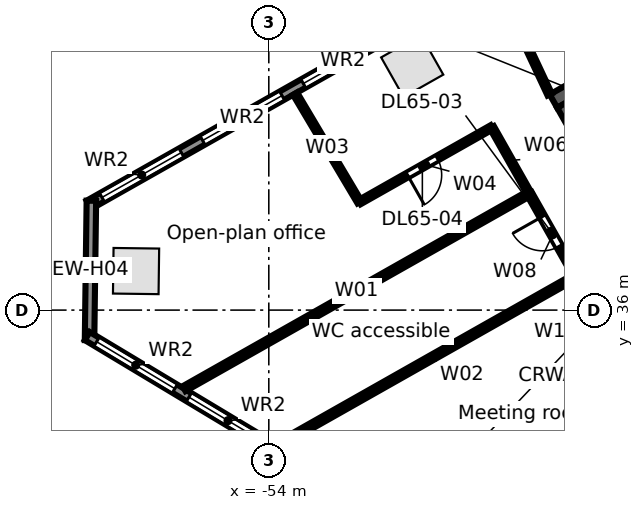
"""IFC4 building model, lengths in metres.
Left out: names, types, materials, properties, quantities, classifications, styles, units other than length and angle.
Written with IfcOpenShell. Run it as: python <this file> out.ifc"""

import sys

from ifc_helpers import new_model, si_unit, direction, frame, frame_2d, origin, origin_2d, place, context, subcontext, project, spatial, rectangle, extrude, element, fill, save


model = new_model("IFC4")
c1 = context("Model", 3, precision=1e-05, world=origin(), true_north=direction((0.0, 1.0)))
c2 = subcontext(c1, "Body", "Model", "MODEL_VIEW")
j1 = project(units=[si_unit("LENGTHUNIT", "METRE"), si_unit("PLANEANGLEUNIT", "RADIAN")], contexts=[c1])
p1 = place(None, origin())
s1 = spatial("IfcSite", under=j1, at=p1, CompositionType="ELEMENT")
p2 = place(p1, origin())
s2 = spatial("IfcBuilding", under=s1, at=p2, CompositionType="ELEMENT")
p3 = place(p2, frame((0.0, 0.0, 293.1)))
s3 = spatial("IfcBuildingStorey", under=s2, at=p3, CompositionType="ELEMENT", Elevation=293.1)
for number, where, z_axis, x_axis in (
    (1, (-50.226, 42.423, 0.0), (0.0, 0.0, 1.0), (-0.87, -0.492, 0.0)),
    (2, (-57.493, 37.027, 0.0), (0.0, 0.0, 1.0), (-0.013, -1.0, 0.0)),
):
    element("IfcColumn", number, at=place(p3, frame(where, z_axis=z_axis, x_axis=x_axis)), inside=s3, PredefinedType="COLUMN", context=c2, shape_type="SweptSolid", body=[
        extrude(rectangle(XDim=1.2, YDim=1.2, at=origin_2d()), origin(), (0.0, 0.0, 1.0), 3.8),
    ])
p4 = place(p3, frame((-58.732, 38.771, 0.0), z_axis=(0.0, 0.0, 1.0), x_axis=(0.870355615581, 0.492423702137, 0.0)))
e3 = element("IfcWall", 3, at=p4, inside=s3, PredefinedType="STANDARD", context=c2, shape_type="SweptSolid", body=[
    extrude(rectangle(XDim=64.052, YDim=0.25, at=frame_2d((32.026, 0.0))), origin(), (0.0, 0.0, 1.0), 3.52),
])
p5 = place(p4, frame((61.259, 0.0, 0.8)))
e4 = element("IfcOpeningElement", 4, at=p5, cuts=e3, PredefinedType="OPENING", context=c2, shape_type="SweptSolid", body=[
    extrude(rectangle(XDim=2.4, YDim=2.2, at=frame_2d((1.2, 1.1))), frame((0.0, 0.135, 0.0), z_axis=(0.0, -1.0, 0.0), x_axis=(1.0, 0.0, 0.0)), (0.0, 0.0, 1.0), 0.27),
])
p6 = place(p4, frame((58.216, 0.0, 0.8)))
e5 = element("IfcOpeningElement", 5, at=p6, cuts=e3, PredefinedType="OPENING", context=c2, shape_type="SweptSolid", body=[
    extrude(rectangle(XDim=2.4, YDim=2.2, at=frame_2d((1.2, 1.1))), frame((0.0, 0.135, 0.0), z_axis=(0.0, -1.0, 0.0), x_axis=(1.0, 0.0, 0.0)), (0.0, 0.0, 1.0), 0.27),
])
p7 = place(p4, frame((55.173, 0.0, 0.8)))
e6 = element("IfcOpeningElement", 6, at=p7, cuts=e3, PredefinedType="OPENING", context=c2, shape_type="SweptSolid", body=[
    extrude(rectangle(XDim=2.4, YDim=2.2, at=frame_2d((1.2, 1.1))), frame((0.0, 0.135, 0.0), z_axis=(0.0, -1.0, 0.0), x_axis=(1.0, 0.0, 0.0)), (0.0, 0.0, 1.0), 0.27),
])
p8 = place(p4, frame((52.129, 0.0, 0.8)))
e7 = element("IfcOpeningElement", 7, at=p8, cuts=e3, PredefinedType="OPENING", context=c2, shape_type="SweptSolid", body=[
    extrude(rectangle(XDim=2.4, YDim=2.2, at=frame_2d((1.2, 1.1))), frame((0.0, 0.135, 0.0), z_axis=(0.0, -1.0, 0.0), x_axis=(1.0, 0.0, 0.0)), (0.0, 0.0, 1.0), 0.27),
])
p9 = place(p4, frame((49.086, 0.0, 0.8)))
e8 = element("IfcOpeningElement", 8, at=p9, cuts=e3, PredefinedType="OPENING", context=c2, shape_type="SweptSolid", body=[
    extrude(rectangle(XDim=2.4, YDim=2.2, at=frame_2d((1.2, 1.1))), frame((0.0, 0.135, 0.0), z_axis=(0.0, -1.0, 0.0), x_axis=(1.0, 0.0, 0.0)), (0.0, 0.0, 1.0), 0.27),
])
p10 = place(p4, frame((46.043, 0.0, 0.8)))
e9 = element("IfcOpeningElement", 9, at=p10, cuts=e3, PredefinedType="OPENING", context=c2, shape_type="SweptSolid", body=[
    extrude(rectangle(XDim=2.4, YDim=2.2, at=frame_2d((1.2, 1.1))), frame((0.0, 0.135, 0.0), z_axis=(0.0, -1.0, 0.0), x_axis=(1.0, 0.0, 0.0)), (0.0, 0.0, 1.0), 0.27),
])
p11 = place(p4, frame((43.0, 0.0, 0.8)))
e10 = element("IfcOpeningElement", 10, at=p11, cuts=e3, PredefinedType="OPENING", context=c2, shape_type="SweptSolid", body=[
    extrude(rectangle(XDim=2.4, YDim=2.2, at=frame_2d((1.2, 1.1))), frame((0.0, 0.135, 0.0), z_axis=(0.0, -1.0, 0.0), x_axis=(1.0, 0.0, 0.0)), (0.0, 0.0, 1.0), 0.27),
])
p12 = place(p4, frame((39.956, 0.0, 0.8)))
e11 = element("IfcOpeningElement", 11, at=p12, cuts=e3, PredefinedType="OPENING", context=c2, shape_type="SweptSolid", body=[
    extrude(rectangle(XDim=2.4, YDim=2.2, at=frame_2d((1.2, 1.1))), frame((0.0, 0.135, 0.0), z_axis=(0.0, -1.0, 0.0), x_axis=(1.0, 0.0, 0.0)), (0.0, 0.0, 1.0), 0.27),
])
p13 = place(p4, frame((36.913, 0.0, 0.8)))
e12 = element("IfcOpeningElement", 12, at=p13, cuts=e3, PredefinedType="OPENING", context=c2, shape_type="SweptSolid", body=[
    extrude(rectangle(XDim=2.4, YDim=2.2, at=frame_2d((1.2, 1.1))), frame((0.0, 0.135, 0.0), z_axis=(0.0, -1.0, 0.0), x_axis=(1.0, 0.0, 0.0)), (0.0, 0.0, 1.0), 0.27),
])
p14 = place(p4, frame((33.87, 0.0, 0.8)))
e13 = element("IfcOpeningElement", 13, at=p14, cuts=e3, PredefinedType="OPENING", context=c2, shape_type="SweptSolid", body=[
    extrude(rectangle(XDim=2.4, YDim=2.2, at=frame_2d((1.2, 1.1))), frame((0.0, 0.135, 0.0), z_axis=(0.0, -1.0, 0.0), x_axis=(1.0, 0.0, 0.0)), (0.0, 0.0, 1.0), 0.27),
])
p15 = place(p4, frame((30.826, 0.0, 0.8)))
e14 = element("IfcOpeningElement", 14, at=p15, cuts=e3, PredefinedType="OPENING", context=c2, shape_type="SweptSolid", body=[
    extrude(rectangle(XDim=2.4, YDim=2.2, at=frame_2d((1.2, 1.1))), frame((0.0, 0.135, 0.0), z_axis=(0.0, -1.0, 0.0), x_axis=(1.0, 0.0, 0.0)), (0.0, 0.0, 1.0), 0.27),
])
p16 = place(p4, frame((27.783, 0.0, 0.8)))
e15 = element("IfcOpeningElement", 15, at=p16, cuts=e3, PredefinedType="OPENING", context=c2, shape_type="SweptSolid", body=[
    extrude(rectangle(XDim=2.4, YDim=2.2, at=frame_2d((1.2, 1.1))), frame((0.0, 0.135, 0.0), z_axis=(0.0, -1.0, 0.0), x_axis=(1.0, 0.0, 0.0)), (0.0, 0.0, 1.0), 0.27),
])
p17 = place(p4, frame((24.74, 0.0, 0.8)))
e16 = element("IfcOpeningElement", 16, at=p17, cuts=e3, PredefinedType="OPENING", context=c2, shape_type="SweptSolid", body=[
    extrude(rectangle(XDim=2.4, YDim=2.2, at=frame_2d((1.2, 1.1))), frame((0.0, 0.135, 0.0), z_axis=(0.0, -1.0, 0.0), x_axis=(1.0, 0.0, 0.0)), (0.0, 0.0, 1.0), 0.27),
])
p18 = place(p4, frame((21.696, 0.0, 0.8)))
e17 = element("IfcOpeningElement", 17, at=p18, cuts=e3, PredefinedType="OPENING", context=c2, shape_type="SweptSolid", body=[
    extrude(rectangle(XDim=2.4, YDim=2.2, at=frame_2d((1.2, 1.1))), frame((0.0, 0.135, 0.0), z_axis=(0.0, -1.0, 0.0), x_axis=(1.0, 0.0, 0.0)), (0.0, 0.0, 1.0), 0.27),
])
p19 = place(p4, frame((18.653, 0.0, 0.8)))
e18 = element("IfcOpeningElement", 18, at=p19, cuts=e3, PredefinedType="OPENING", context=c2, shape_type="SweptSolid", body=[
    extrude(rectangle(XDim=2.4, YDim=2.2, at=frame_2d((1.2, 1.1))), frame((0.0, 0.135, 0.0), z_axis=(0.0, -1.0, 0.0), x_axis=(1.0, 0.0, 0.0)), (0.0, 0.0, 1.0), 0.27),
])
p20 = place(p4, frame((15.61, 0.0, 0.8)))
e19 = element("IfcOpeningElement", 19, at=p20, cuts=e3, PredefinedType="OPENING", context=c2, shape_type="SweptSolid", body=[
    extrude(rectangle(XDim=2.4, YDim=2.2, at=frame_2d((1.2, 1.1))), frame((0.0, 0.135, 0.0), z_axis=(0.0, -1.0, 0.0), x_axis=(1.0, 0.0, 0.0)), (0.0, 0.0, 1.0), 0.27),
])
p21 = place(p4, frame((12.567, 0.0, 0.8)))
e20 = element("IfcOpeningElement", 20, at=p21, cuts=e3, PredefinedType="OPENING", context=c2, shape_type="SweptSolid", body=[
    extrude(rectangle(XDim=2.4, YDim=2.2, at=frame_2d((1.2, 1.1))), frame((0.0, 0.135, 0.0), z_axis=(0.0, -1.0, 0.0), x_axis=(1.0, 0.0, 0.0)), (0.0, 0.0, 1.0), 0.27),
])
p22 = place(p4, frame((9.523, 0.0, 0.8)))
e21 = element("IfcOpeningElement", 21, at=p22, cuts=e3, PredefinedType="OPENING", context=c2, shape_type="SweptSolid", body=[
    extrude(rectangle(XDim=2.4, YDim=2.2, at=frame_2d((1.2, 1.1))), frame((0.0, 0.135, 0.0), z_axis=(0.0, -1.0, 0.0), x_axis=(1.0, 0.0, 0.0)), (0.0, 0.0, 1.0), 0.27),
])
p23 = place(p4, frame((6.48, 0.0, 0.8)))
e22 = element("IfcOpeningElement", 22, at=p23, cuts=e3, PredefinedType="OPENING", context=c2, shape_type="SweptSolid", body=[
    extrude(rectangle(XDim=2.4, YDim=2.2, at=frame_2d((1.2, 1.1))), frame((0.0, 0.135, 0.0), z_axis=(0.0, -1.0, 0.0), x_axis=(1.0, 0.0, 0.0)), (0.0, 0.0, 1.0), 0.27),
])
p24 = place(p4, frame((3.437, 0.0, 0.8)))
e23 = element("IfcOpeningElement", 23, at=p24, cuts=e3, PredefinedType="OPENING", context=c2, shape_type="SweptSolid", body=[
    extrude(rectangle(XDim=2.4, YDim=2.2, at=frame_2d((1.2, 1.1))), frame((0.0, 0.135, 0.0), z_axis=(0.0, -1.0, 0.0), x_axis=(1.0, 0.0, 0.0)), (0.0, 0.0, 1.0), 0.27),
])
p25 = place(p4, frame((0.393, 0.0, 0.8)))
e24 = element("IfcOpeningElement", 24, at=p25, cuts=e3, PredefinedType="OPENING", context=c2, shape_type="SweptSolid", body=[
    extrude(rectangle(XDim=2.4, YDim=2.2, at=frame_2d((1.2, 1.1))), frame((0.0, 0.135, 0.0), z_axis=(0.0, -1.0, 0.0), x_axis=(1.0, 0.0, 0.0)), (0.0, 0.0, 1.0), 0.27),
])
p26 = place(p3, frame((-58.717, 35.208, 0.0), z_axis=(0.0, 0.0, 1.0), x_axis=(0.01310512158, 0.999914124207, 0.0)))
e25 = element("IfcWall", 25, at=p26, inside=s3, PredefinedType="STANDARD", context=c2, shape_type="SweptSolid", body=[
    extrude(rectangle(XDim=3.67, YDim=0.25, at=frame_2d((1.835, 0.0))), origin(), (0.0, 0.0, 1.0), 3.52),
])
p27 = place(p3, frame((-44.115, 26.507, 0.0), z_axis=(0.0, 0.0, 1.0), x_axis=(-0.857166583633, 0.515039268311, 0.0)))
e26 = element("IfcWall", 26, at=p27, inside=s3, PredefinedType="STANDARD", context=c2, shape_type="SweptSolid", body=[
    extrude(rectangle(XDim=17.106, YDim=0.25, at=frame_2d((8.553, 0.0))), origin(), (0.0, 0.0, 1.0), 3.52),
])
p28 = place(p27, frame((14.417, 0.0, 0.8)))
e27 = element("IfcOpeningElement", 27, at=p28, cuts=e26, PredefinedType="OPENING", context=c2, shape_type="SweptSolid", body=[
    extrude(rectangle(XDim=2.4, YDim=2.2, at=frame_2d((1.2, 1.1))), frame((0.0, 0.135, 0.0), z_axis=(0.0, -1.0, 0.0), x_axis=(1.0, 0.0, 0.0)), (0.0, 0.0, 1.0), 0.27),
])
p29 = place(p27, frame((11.584, 0.0, 0.8)))
e28 = element("IfcOpeningElement", 28, at=p29, cuts=e26, PredefinedType="OPENING", context=c2, shape_type="SweptSolid", body=[
    extrude(rectangle(XDim=2.4, YDim=2.2, at=frame_2d((1.2, 1.1))), frame((0.0, 0.135, 0.0), z_axis=(0.0, -1.0, 0.0), x_axis=(1.0, 0.0, 0.0)), (0.0, 0.0, 1.0), 0.27),
])
p30 = place(p27, frame((8.75, 0.0, 0.8)))
e29 = element("IfcOpeningElement", 29, at=p30, cuts=e26, PredefinedType="OPENING", context=c2, shape_type="SweptSolid", body=[
    extrude(rectangle(XDim=2.4, YDim=2.2, at=frame_2d((1.2, 1.1))), frame((0.0, 0.135, 0.0), z_axis=(0.0, -1.0, 0.0), x_axis=(1.0, 0.0, 0.0)), (0.0, 0.0, 1.0), 0.27),
])
p31 = place(p27, frame((5.917, 0.0, 0.8)))
e30 = element("IfcOpeningElement", 30, at=p31, cuts=e26, PredefinedType="OPENING", context=c2, shape_type="SweptSolid", body=[
    extrude(rectangle(XDim=2.4, YDim=2.2, at=frame_2d((1.2, 1.1))), frame((0.0, 0.135, 0.0), z_axis=(0.0, -1.0, 0.0), x_axis=(1.0, 0.0, 0.0)), (0.0, 0.0, 1.0), 0.27),
])
p32 = place(p27, frame((3.084, 0.0, 0.8)))
e31 = element("IfcOpeningElement", 31, at=p32, cuts=e26, PredefinedType="OPENING", context=c2, shape_type="SweptSolid", body=[
    extrude(rectangle(XDim=2.4, YDim=2.2, at=frame_2d((1.2, 1.1))), frame((0.0, 0.135, 0.0), z_axis=(0.0, -1.0, 0.0), x_axis=(1.0, 0.0, 0.0)), (0.0, 0.0, 1.0), 0.27),
])
p33 = place(p27, frame((0.25, 0.0, 0.8)))
e32 = element("IfcOpeningElement", 32, at=p33, cuts=e26, PredefinedType="OPENING", context=c2, shape_type="SweptSolid", body=[
    extrude(rectangle(XDim=2.4, YDim=2.2, at=frame_2d((1.2, 1.1))), frame((0.0, 0.135, 0.0), z_axis=(0.0, -1.0, 0.0), x_axis=(1.0, 0.0, 0.0)), (0.0, 0.0, 1.0), 0.27),
])
p34 = place(p3, frame((-46.51, 41.499, 0.0), z_axis=(0.0, 0.0, 1.0), x_axis=(0.870356271124, 0.492422543467, 0.0)))
e33 = element("IfcWall", 33, at=p34, inside=s3, PredefinedType="SOLIDWALL", context=c2, shape_type="SweptSolid", body=[
    extrude(rectangle(XDim=17.0, YDim=0.4, at=frame_2d((8.5, 0.0))), origin(), (0.0, 0.0, 1.0), 3.52),
])
p35 = place(p3, frame((-46.238, 41.423, 0.0), z_axis=(0.0, 0.0, 1.0), x_axis=(0.492421663121, -0.870356769198, 0.0)))
e34 = element("IfcWall", 34, at=p35, inside=s3, PredefinedType="SOLIDWALL", context=c2, shape_type="SweptSolid", body=[
    extrude(rectangle(XDim=13.2, YDim=0.4, at=frame_2d((6.6, 0.0))), origin(), (0.0, 0.0, 1.0), 3.52),
])
p36 = place(p3, frame((-56.229, 33.932, 0.0), z_axis=(0.0, 0.0, 1.0), x_axis=(0.870363189886, 0.492410314364, 0.0)))
e35 = element("IfcWall", 35, at=p36, inside=s3, PredefinedType="PARTITIONING", context=c2, shape_type="SweptSolid", body=[
    extrude(rectangle(XDim=10.435, YDim=0.15, at=frame_2d((5.217, 0.0))), origin(), (0.0, 0.0, 1.0), 2.8),
])
p37 = place(p3, frame((-53.767, 32.453, 0.0), z_axis=(0.0, 0.0, 1.0), x_axis=(0.870345499828, 0.492441581235, 0.0)))
e36 = element("IfcWall", 36, at=p37, inside=s3, PredefinedType="PARTITIONING", context=c2, shape_type="SweptSolid", body=[
    extrude(rectangle(XDim=9.021, YDim=0.15, at=frame_2d((4.51, 0.0))), origin(), (0.0, 0.0, 1.0), 2.8),
])
p38 = place(p3, frame((-53.309, 41.696, 0.0), z_axis=(0.0, 0.0, 1.0), x_axis=(0.510739180143, -0.859735709312, 0.0)))
e37 = element("IfcWall", 37, at=p38, inside=s3, PredefinedType="PARTITIONING", context=c2, shape_type="SweptSolid", body=[
    extrude(rectangle(XDim=3.321, YDim=0.125, at=frame_2d((1.66, 0.0))), origin(), (0.0, 0.0, 1.0), 2.894),
])
p39 = place(p3, frame((-51.613, 38.841, 0.0), z_axis=(0.0, 0.0, 1.0), x_axis=(0.870297830159, 0.492525823506, 0.0)))
e38 = element("IfcWall", 38, at=p39, inside=s3, PredefinedType="PARTITIONING", context=c2, shape_type="SweptSolid", body=[
    extrude(rectangle(XDim=4.0, YDim=0.125, at=frame_2d((2.0, 0.0))), origin(), (0.0, 0.0, 1.0), 2.8),
])
p40 = place(p39, frame((1.45, 0.0, 0.0)))
e39 = element("IfcOpeningElement", 39, at=p40, cuts=e38, PredefinedType="OPENING", context=c2, shape_type="SweptSolid", body=[
    extrude(rectangle(XDim=0.9, YDim=2.1, at=frame_2d((0.45, 1.05))), frame((0.0, 0.073, 0.0), z_axis=(0.0, -1.0, 0.0), x_axis=(1.0, 0.0, 0.0)), (0.0, 0.0, 1.0), 0.145),
])
p41 = place(p3, frame((-48.132, 40.811, 0.0), z_axis=(0.0, 0.0, 1.0), x_axis=(0.492467412326, -0.870330884088, 0.0)))
e40 = element("IfcWall", 40, at=p41, inside=s3, PredefinedType="PARTITIONING", context=c2, shape_type="SweptSolid", body=[
    extrude(rectangle(XDim=2.0, YDim=0.125, at=frame_2d((1.0, 0.0))), origin(), (0.0, 0.0, 1.0), 3.52),
])
p42 = place(p3, frame((-48.022, 44.687, 0.0), z_axis=(0.0, 0.0, 1.0), x_axis=(0.424510917438, -0.905422818895, 0.0)))
e41 = element("IfcWall", 41, at=p42, inside=s3, PredefinedType="PARTITIONING", context=c2, shape_type="SweptSolid", body=[
    extrude(rectangle(XDim=3.329, YDim=0.125, at=frame_2d((1.665, 0.0))), origin(), (0.0, 0.0, 1.0), 2.888),
])
p43 = place(p3, frame((-47.147, 39.07, 0.0), z_axis=(0.0, 0.0, 1.0), x_axis=(0.492536798944, -0.870291618761, 0.0)))
e42 = element("IfcWall", 42, at=p43, inside=s3, PredefinedType="PARTITIONING", context=c2, shape_type="SweptSolid", body=[
    extrude(rectangle(XDim=2.499, YDim=0.15, at=frame_2d((1.25, 0.0))), origin(), (0.0, 0.0, 1.0), 3.52),
])
p44 = place(p43, frame((0.7, 0.0, 0.0)))
e43 = element("IfcOpeningElement", 43, at=p44, cuts=e42, PredefinedType="OPENING", context=c2, shape_type="SweptSolid", body=[
    extrude(rectangle(XDim=0.9, YDim=2.1, at=frame_2d((0.45, 1.05))), frame((0.0, 0.085, 0.0), z_axis=(0.0, -1.0, 0.0), x_axis=(1.0, 0.0, 0.0)), (0.0, 0.0, 1.0), 0.17),
])
p45 = place(p23, origin())
e44 = element("IfcWindow", 44, at=p45, inside=s3, PartitioningType="SINGLE_PANEL", PredefinedType="WINDOW", context=c2, shape_type="SweptSolid", body=[
    extrude(rectangle(XDim=2.4, YDim=2.2, at=frame_2d((1.2, 1.1))), frame((0.0, 0.03, 0.0), z_axis=(0.0, -1.0, 0.0), x_axis=(1.0, 0.0, 0.0)), (0.0, 0.0, 1.0), 0.06),
])
fill(e22, e44)
p46 = place(p24, origin())
e45 = element("IfcWindow", 45, at=p46, inside=s3, PartitioningType="SINGLE_PANEL", PredefinedType="WINDOW", context=c2, shape_type="SweptSolid", body=[
    extrude(rectangle(XDim=2.4, YDim=2.2, at=frame_2d((1.2, 1.1))), frame((0.0, 0.03, 0.0), z_axis=(0.0, -1.0, 0.0), x_axis=(1.0, 0.0, 0.0)), (0.0, 0.0, 1.0), 0.06),
])
fill(e23, e45)
p47 = place(p25, origin())
e46 = element("IfcWindow", 46, at=p47, inside=s3, PartitioningType="SINGLE_PANEL", PredefinedType="WINDOW", context=c2, shape_type="SweptSolid", body=[
    extrude(rectangle(XDim=2.4, YDim=2.2, at=frame_2d((1.2, 1.1))), frame((0.0, 0.03, 0.0), z_axis=(0.0, -1.0, 0.0), x_axis=(1.0, 0.0, 0.0)), (0.0, 0.0, 1.0), 0.06),
])
fill(e24, e46)
p48 = place(p28, origin())
e47 = element("IfcWindow", 47, at=p48, inside=s3, PartitioningType="SINGLE_PANEL", PredefinedType="WINDOW", context=c2, shape_type="SweptSolid", body=[
    extrude(rectangle(XDim=2.4, YDim=2.2, at=frame_2d((1.2, 1.1))), frame((0.0, 0.03, 0.0), z_axis=(0.0, -1.0, 0.0), x_axis=(1.0, 0.0, 0.0)), (0.0, 0.0, 1.0), 0.06),
])
fill(e27, e47)
p49 = place(p29, origin())
e48 = element("IfcWindow", 48, at=p49, inside=s3, PartitioningType="SINGLE_PANEL", PredefinedType="WINDOW", context=c2, shape_type="SweptSolid", body=[
    extrude(rectangle(XDim=2.4, YDim=2.2, at=frame_2d((1.2, 1.1))), frame((0.0, 0.03, 0.0), z_axis=(0.0, -1.0, 0.0), x_axis=(1.0, 0.0, 0.0)), (0.0, 0.0, 1.0), 0.06),
])
fill(e28, e48)
p50 = place(p44, frame((0.9, 0.0, 0.0), z_axis=(0.0, 0.0, 1.0), x_axis=(-1.0, 0.0, 0.0)))
e49 = element("IfcDoor", 49, at=p50, inside=s3, OperationType="SINGLE_SWING_RIGHT", PredefinedType="DOOR", context=c2, shape_type="SweptSolid", body=[
    extrude(rectangle(XDim=0.9, YDim=2.1, at=frame_2d((0.45, 1.05))), frame((0.0, 0.025, 0.0), z_axis=(0.0, -1.0, 0.0), x_axis=(1.0, 0.0, 0.0)), (0.0, 0.0, 1.0), 0.05),
])
fill(e43, e49)
p51 = place(p40, frame((0.9, 0.0, 0.0), z_axis=(0.0, 0.0, 1.0), x_axis=(-1.0, 0.0, 0.0)))
e50 = element("IfcDoor", 50, at=p51, inside=s3, OperationType="SINGLE_SWING_RIGHT", PredefinedType="DOOR", context=c2, shape_type="SweptSolid", body=[
    extrude(rectangle(XDim=0.9, YDim=2.1, at=frame_2d((0.45, 1.05))), frame((0.0, 0.025, 0.0), z_axis=(0.0, -1.0, 0.0), x_axis=(1.0, 0.0, 0.0)), (0.0, 0.0, 1.0), 0.05),
])
fill(e39, e50)
save(model, sys.argv[1])
